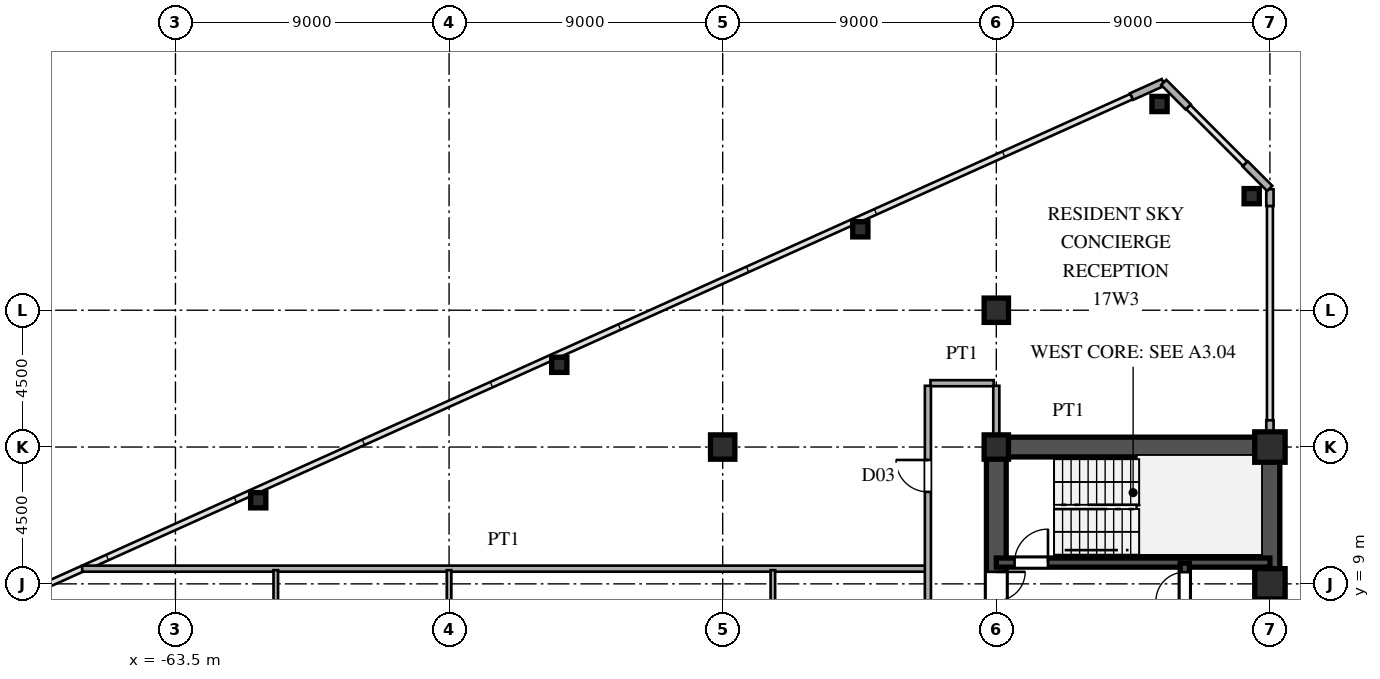
"""IFC4 building model, lengths in metres.
Left out: names, types, materials, properties, quantities, classifications, styles, units other than length and angle.
Written with IfcOpenShell. Run it as: python <this file> out.ifc"""

import sys

from ifc_helpers import new_model, si_unit, direction, frame, frame_2d, origin, origin_2d, place, context, subcontext, project, spatial, rectangle, hollow_rectangle, i_section, extrude, source, transform, mapped, element, fill, save


model = new_model("IFC4")
c1 = context("Model", 3, precision=1e-05, world=origin(), true_north=direction((0.0, 1.0)))
c2 = subcontext(c1, "Body", "Model", "MODEL_VIEW")
j1 = project(units=[si_unit("LENGTHUNIT", "METRE"), si_unit("PLANEANGLEUNIT", "RADIAN")], contexts=[c1])
p1 = place(None, origin())
s1 = spatial("IfcSite", under=j1, at=p1, CompositionType="ELEMENT")
p2 = place(p1, origin())
s2 = spatial("IfcBuilding", under=s1, at=p2, CompositionType="ELEMENT")
p3 = place(p2, frame((0.0, 0.0, 65.7)))
s3 = spatial("IfcBuildingStorey", under=s2, at=p3, CompositionType="ELEMENT", Elevation=65.7)
m1 = source(origin(), c2, "Body", "SweptSolid", [
    extrude(hollow_rectangle(XDim=1.0, YDim=1.0, WallThickness=0.042, at=origin_2d()), origin(), (0.0, 0.0, 1.0), 3.6),
])
for number, where, z_axis, x_axis in (
    (1, (-27.5, 9.0, 0.0), (0.0, 0.0, 1.0), (1.0, 0.0, 0.0)),
    (2, (-27.5, 13.5, 0.0), (0.0, 0.0, 1.0), (1.0, 0.0, 0.0)),
):
    element("IfcColumn", number, at=place(p3, frame(where, z_axis=z_axis, x_axis=x_axis)), inside=s3, PredefinedType="COLUMN", context=c2, shape_type="MappedRepresentation", body=[
        mapped(m1, transform((0.0, 0.0, 0.0), scale=1.0)),
    ])
m2 = source(origin(), c2, "Body", "SweptSolid", [
    extrude(i_section(OverallWidth=0.8, OverallDepth=0.8, WebThickness=0.032, FlangeThickness=0.05, at=origin_2d()), origin(), (0.0, 0.0, 1.0), 3.6),
])
for number, where, z_axis, x_axis in (
    (3, (-36.5, 13.5, 0.0), (0.0, 0.0, 1.0), (1.0, 0.0, 0.0)),
    (4, (-36.5, 18.0, 0.0), (0.0, 0.0, 1.0), (1.0, 0.0, 0.0)),
    (5, (-45.5, 13.5, 0.0), (0.0, 0.0, 1.0), (1.0, 0.0, 0.0)),
):
    element("IfcColumn", number, at=place(p3, frame(where, z_axis=z_axis, x_axis=x_axis)), inside=s3, PredefinedType="COLUMN", context=c2, shape_type="MappedRepresentation", body=[
        mapped(m2, transform((0.0, 0.0, 0.0), scale=1.0)),
    ])
m3 = source(origin(), c2, "Body", "SweptSolid", [
    extrude(hollow_rectangle(XDim=0.5, YDim=0.5, WallThickness=0.02, at=origin_2d()), origin(), (0.0, 0.0, 1.0), 3.6),
])
for number, where, z_axis, x_axis in (
    (6, (-28.1, 21.751, 0.0), (0.0, 0.0, 1.0), (1.0, 0.0, 0.0)),
    (7, (-31.131, 24.783, 0.0), (0.0, 0.0, 1.0), (1.0, 0.0, 0.0)),
    (8, (-40.973, 20.661, 0.0), (0.0, 0.0, 1.0), (1.0, 0.0, 0.0)),
    (9, (-50.875, 16.205, 0.0), (0.0, 0.0, 1.0), (1.0, 0.0, 0.0)),
    (10, (-60.778, 11.749, 0.0), (0.0, 0.0, 1.0), (1.0, 0.0, 0.0)),
):
    element("IfcColumn", number, at=place(p3, frame(where, z_axis=z_axis, x_axis=x_axis)), inside=s3, PredefinedType="COLUMN", context=c2, shape_type="MappedRepresentation", body=[
        mapped(m3, transform((0.0, 0.0, 0.0), scale=1.0)),
    ])
p4 = place(p3, frame((-27.5, 13.83, 0.0), z_axis=(0.0, 0.0, 1.0), x_axis=(0.0, 1.0, 0.0)))
e11 = element("IfcWall", 11, at=p4, inside=s3, PredefinedType="SOLIDWALL", context=c2, shape_type="SweptSolid", body=[
    extrude(rectangle(XDim=0.55, YDim=0.24, at=frame_2d((0.275, 0.0))), origin(), (0.0, 0.0, 1.0), 2.88),
])
p5 = place(p3, frame((-27.5, 21.43, 0.0), z_axis=(0.0, 0.0, 1.0), x_axis=(0.0, 1.0, 0.0)))
e12 = element("IfcWall", 12, at=p5, inside=s3, PredefinedType="SOLIDWALL", context=c2, shape_type="SweptSolid", body=[
    extrude(rectangle(XDim=0.55, YDim=0.24, at=frame_2d((0.275, 0.0))), origin(), (0.0, 0.0, 1.0), 3.38),
])
for number, where, z_axis, x_axis in (
    (13, (-27.507, 22.007, 0.0), (0.0, 0.0, 1.0), (-0.707, 0.707, 0.0)),
    (14, (-30.187, 24.687, 0.0), (0.0, 0.0, 1.0), (-0.707, 0.707, 0.0)),
):
    element("IfcWall", number, at=place(p3, frame(where, z_axis=z_axis, x_axis=x_axis)), inside=s3, PredefinedType="SOLIDWALL", context=c2, shape_type="SweptSolid", body=[
        extrude(rectangle(XDim=1.14, YDim=0.24, at=frame_2d((0.57, 0.0))), origin(), (0.0, 0.0, 1.0), 3.38),
    ])
p6 = place(p3, frame((-31.009, 25.496, 0.0), z_axis=(0.0, 0.0, 1.0), x_axis=(-0.911929519623, -0.410346866979, 0.0)))
e15 = element("IfcWall", 15, at=p6, inside=s3, PredefinedType="SOLIDWALL", context=c2, shape_type="SweptSolid", body=[
    extrude(rectangle(XDim=1.14, YDim=0.24, at=frame_2d((0.57, 0.0))), origin(), (0.0, 0.0, 1.0), 3.38),
])
p7 = place(p3, frame((-27.5, 1.3, 0.0), z_axis=(0.0, 0.0, 1.0), x_axis=(0.0, 1.0, 0.0)))
e16 = element("IfcWall", 16, at=p7, inside=s3, PredefinedType="SHEAR", context=c2, shape_type="SweptSolid", body=[
    extrude(rectangle(XDim=12.2, YDim=0.65, at=frame_2d((6.1, 0.0))), origin(), (0.0, 0.0, 1.0), 3.38),
])
p8 = place(p3, frame((-36.5, 13.5, 0.0), z_axis=(0.0, 0.0, 1.0), x_axis=(1.0, 0.0, 0.0)))
e17 = element("IfcWall", 17, at=p8, inside=s3, PredefinedType="SHEAR", context=c2, shape_type="SweptSolid", body=[
    extrude(rectangle(XDim=9.0, YDim=0.65, at=frame_2d((4.5, 0.0))), origin(), (0.0, 0.0, 1.0), 3.38),
])
p9 = place(p3, frame((-36.5, 8.2, 0.0), z_axis=(0.0, 0.0, 1.0), x_axis=(0.0, 1.0, 0.0)))
e18 = element("IfcWall", 18, at=p9, inside=s3, PredefinedType="SHEAR", context=c2, shape_type="SweptSolid", body=[
    extrude(rectangle(XDim=5.45, YDim=0.65, at=frame_2d((2.725, 0.0))), origin(), (0.0, 0.0, 1.0), 3.38),
])
p10 = place(p9, frame((0.245, 0.0, 0.0)))
e19 = element("IfcOpeningElement", 19, at=p10, cuts=e18, PredefinedType="OPENING", context=c2, shape_type="SweptSolid", body=[
    extrude(rectangle(XDim=0.95, YDim=2.15, at=frame_2d((0.475, 1.075))), frame((0.0, 0.335, 0.0), z_axis=(0.0, -1.0, 0.0), x_axis=(1.0, 0.0, 0.0)), (0.0, 0.0, 1.0), 0.67),
])
p11 = place(p3, frame((-36.5, 9.7, 0.0), z_axis=(0.0, 0.0, 1.0), x_axis=(1.0, 0.0, 0.0)))
e20 = element("IfcWall", 20, at=p11, inside=s3, PredefinedType="SHEAR", context=c2, shape_type="SweptSolid", body=[
    extrude(rectangle(XDim=9.0, YDim=0.3, at=frame_2d((4.5, 0.0))), origin(), (0.0, 0.0, 1.0), 3.38),
])
p12 = place(p11, frame((0.6, 0.0, 0.0)))
e21 = element("IfcOpeningElement", 21, at=p12, cuts=e20, PredefinedType="OPENING", context=c2, shape_type="SweptSolid", body=[
    extrude(rectangle(XDim=1.1, YDim=2.2, at=frame_2d((0.55, 1.1))), frame((0.0, 0.16, 0.0), z_axis=(0.0, -1.0, 0.0), x_axis=(1.0, 0.0, 0.0)), (0.0, 0.0, 1.0), 0.32),
])
p13 = place(p3, frame((-30.3, 8.15, 0.0), z_axis=(0.0, 0.0, 1.0), x_axis=(0.0, 1.0, 0.0)))
e22 = element("IfcWall", 22, at=p13, inside=s3, PredefinedType="SHEAR", context=c2, shape_type="SweptSolid", body=[
    extrude(rectangle(XDim=1.53, YDim=0.3, at=frame_2d((0.765, 0.0))), origin(), (0.0, 0.0, 1.0), 3.38),
])
p14 = place(p13, frame((0.285, 0.0, 0.0)))
e23 = element("IfcOpeningElement", 23, at=p14, cuts=e22, PredefinedType="OPENING", context=c2, shape_type="SweptSolid", body=[
    extrude(rectangle(XDim=0.95, YDim=2.15, at=frame_2d((0.475, 1.075))), frame((0.0, 0.16, 0.0), z_axis=(0.0, -1.0, 0.0), x_axis=(1.0, 0.0, 0.0)), (0.0, 0.0, 1.0), 0.32),
])
p15 = place(p3, frame((-66.568, 9.5, 0.0), z_axis=(0.0, 0.0, 1.0), x_axis=(1.0, 0.0, 0.0)))
e24 = element("IfcWall", 24, at=p15, inside=s3, PredefinedType="PARTITIONING", context=c2, shape_type="SweptSolid", body=[
    extrude(rectangle(XDim=27.738, YDim=0.2, at=frame_2d((13.869, 0.0))), origin(), (0.0, 0.0, 1.0), 3.38),
])
p16 = place(p3, frame((-38.665, 15.6, 0.0), z_axis=(0.0, 0.0, 1.0), x_axis=(1.0, 0.0, 0.0)))
e25 = element("IfcWall", 25, at=p16, inside=s3, PredefinedType="PARTITIONING", context=c2, shape_type="SweptSolid", body=[
    extrude(rectangle(XDim=2.08, YDim=0.2, at=frame_2d((1.04, 0.0))), origin(), (0.0, 0.0, 1.0), 3.38),
])
p17 = place(p3, frame((-60.2, -9.522, 0.0), z_axis=(0.0, 0.0, 1.0), x_axis=(0.0, 1.0, 0.0)))
e26 = element("IfcWall", 26, at=p17, inside=s3, PredefinedType="PARTITIONING", context=c2, shape_type="SweptSolid", body=[
    extrude(rectangle(XDim=18.972, YDim=0.15, at=frame_2d((9.486, 0.0))), origin(), (0.0, 0.0, 1.0), 3.38),
])
p18 = place(p17, frame((2.011, 0.0, 0.0)))
e27 = element("IfcOpeningElement", 27, at=p18, cuts=e26, PredefinedType="OPENING", context=c2, shape_type="SweptSolid", body=[
    extrude(rectangle(XDim=0.95, YDim=2.15, at=frame_2d((0.475, 1.075))), frame((0.0, 0.085, 0.0), z_axis=(0.0, -1.0, 0.0), x_axis=(1.0, 0.0, 0.0)), (0.0, 0.0, 1.0), 0.17),
])
p19 = place(p17, frame((6.88, 0.0, 0.0)))
e28 = element("IfcOpeningElement", 28, at=p19, cuts=e26, PredefinedType="OPENING", context=c2, shape_type="SweptSolid", body=[
    extrude(rectangle(XDim=0.95, YDim=2.15, at=frame_2d((0.475, 1.075))), frame((0.0, 0.085, 0.0), z_axis=(0.0, -1.0, 0.0), x_axis=(1.0, 0.0, 0.0)), (0.0, 0.0, 1.0), 0.17),
])
p20 = place(p17, frame((11.547, 0.0, 0.0)))
e29 = element("IfcOpeningElement", 29, at=p20, cuts=e26, PredefinedType="OPENING", context=c2, shape_type="SweptSolid", body=[
    extrude(rectangle(XDim=0.95, YDim=2.15, at=frame_2d((0.475, 1.075))), frame((0.0, 0.085, 0.0), z_axis=(0.0, -1.0, 0.0), x_axis=(1.0, 0.0, 0.0)), (0.0, 0.0, 1.0), 0.17),
])
p21 = place(p17, frame((16.214, 0.0, 0.0)))
e30 = element("IfcOpeningElement", 30, at=p21, cuts=e26, PredefinedType="OPENING", context=c2, shape_type="SweptSolid", body=[
    extrude(rectangle(XDim=0.95, YDim=2.15, at=frame_2d((0.475, 1.075))), frame((0.0, 0.085, 0.0), z_axis=(0.0, -1.0, 0.0), x_axis=(1.0, 0.0, 0.0)), (0.0, 0.0, 1.0), 0.17),
])
p22 = place(p3, frame((-54.5, -14.595, 0.0), z_axis=(0.0, 0.0, 1.0), x_axis=(0.0, 1.0, 0.0)))
e31 = element("IfcWall", 31, at=p22, inside=s3, PredefinedType="PARTITIONING", context=c2, shape_type="SweptSolid", body=[
    extrude(rectangle(XDim=24.045, YDim=0.15, at=frame_2d((12.022, 0.0))), origin(), (0.0, 0.0, 1.0), 2.68),
])
p23 = place(p22, frame((2.011, 0.0, 0.0)))
e32 = element("IfcOpeningElement", 32, at=p23, cuts=e31, PredefinedType="OPENING", context=c2, shape_type="SweptSolid", body=[
    extrude(rectangle(XDim=0.95, YDim=2.15, at=frame_2d((0.475, 1.075))), frame((0.0, 0.085, 0.0), z_axis=(0.0, -1.0, 0.0), x_axis=(1.0, 0.0, 0.0)), (0.0, 0.0, 1.0), 0.17),
])
p24 = place(p22, frame((7.084, 0.0, 0.0)))
e33 = element("IfcOpeningElement", 33, at=p24, cuts=e31, PredefinedType="OPENING", context=c2, shape_type="SweptSolid", body=[
    extrude(rectangle(XDim=0.95, YDim=2.15, at=frame_2d((0.475, 1.075))), frame((0.0, 0.085, 0.0), z_axis=(0.0, -1.0, 0.0), x_axis=(1.0, 0.0, 0.0)), (0.0, 0.0, 1.0), 0.17),
])
p25 = place(p22, frame((16.62, 0.0, 0.0)))
e34 = element("IfcOpeningElement", 34, at=p25, cuts=e31, PredefinedType="OPENING", context=c2, shape_type="SweptSolid", body=[
    extrude(rectangle(XDim=0.95, YDim=2.15, at=frame_2d((0.475, 1.075))), frame((0.0, 0.085, 0.0), z_axis=(0.0, -1.0, 0.0), x_axis=(1.0, 0.0, 0.0)), (0.0, 0.0, 1.0), 0.17),
])
p26 = place(p3, frame((-43.85, 5.352, 0.0), z_axis=(0.0, 0.0, 1.0), x_axis=(0.0, 1.0, 0.0)))
e35 = element("IfcWall", 35, at=p26, inside=s3, PredefinedType="PARTITIONING", context=c2, shape_type="SweptSolid", body=[
    extrude(rectangle(XDim=4.098, YDim=0.15, at=frame_2d((2.049, 0.0))), origin(), (0.0, 0.0, 1.0), 3.38),
])
p27 = place(p3, frame((-38.75, -15.515, 0.0), z_axis=(0.0, 0.0, 1.0), x_axis=(0.0, 1.0, 0.0)))
e36 = element("IfcWall", 36, at=p27, inside=s3, PredefinedType="PARTITIONING", context=c2, shape_type="SweptSolid", body=[
    extrude(rectangle(XDim=31.03, YDim=0.2, at=frame_2d((15.515, 0.0))), origin(), (0.0, 0.0, 1.0), 3.38),
])
p28 = place(p27, frame((4.913, 0.0, 0.0)))
e37 = element("IfcOpeningElement", 37, at=p28, cuts=e36, PredefinedType="OPENING", context=c2, shape_type="SweptSolid", body=[
    extrude(rectangle(XDim=1.05, YDim=2.25, at=frame_2d((0.525, 1.125))), frame((0.0, 0.11, 0.0), z_axis=(0.0, -1.0, 0.0), x_axis=(1.0, 0.0, 0.0)), (0.0, 0.0, 1.0), 0.22),
])
p29 = place(p27, frame((17.28, 0.0, 0.0)))
e38 = element("IfcOpeningElement", 38, at=p29, cuts=e36, PredefinedType="OPENING", context=c2, shape_type="SweptSolid", body=[
    extrude(rectangle(XDim=1.05, YDim=2.25, at=frame_2d((0.525, 1.125))), frame((0.0, 0.11, 0.0), z_axis=(0.0, -1.0, 0.0), x_axis=(1.0, 0.0, 0.0)), (0.0, 0.0, 1.0), 0.22),
])
p30 = place(p27, frame((27.54, 0.0, 0.0)))
e39 = element("IfcOpeningElement", 39, at=p30, cuts=e36, PredefinedType="OPENING", context=c2, shape_type="SweptSolid", body=[
    extrude(rectangle(XDim=1.05, YDim=2.25, at=frame_2d((0.525, 1.125))), frame((0.0, 0.11, 0.0), z_axis=(0.0, -1.0, 0.0), x_axis=(1.0, 0.0, 0.0)), (0.0, 0.0, 1.0), 0.22),
])
p31 = place(p3, frame((-36.5, 13.83, 0.0), z_axis=(0.0, 0.0, 1.0), x_axis=(0.0, 1.0, 0.0)))
e40 = element("IfcWall", 40, at=p31, inside=s3, PredefinedType="PARTITIONING", context=c2, shape_type="SweptSolid", body=[
    extrude(rectangle(XDim=1.685, YDim=0.2, at=frame_2d((0.842, 0.0))), origin(), (0.0, 0.0, 1.0), 2.68),
])
m4 = source(origin(), c2, "Body", "SweptSolid", [
    extrude(rectangle(XDim=0.95, YDim=2.15, at=frame_2d((0.475, 1.075))), frame((0.0, 0.025, 0.0), z_axis=(0.0, -1.0, 0.0), x_axis=(1.0, 0.0, 0.0)), (0.0, 0.0, 1.0), 0.05),
])
p32 = place(p10, frame((0.95, 0.0, 0.0), z_axis=(0.0, 0.0, 1.0), x_axis=(-1.0, 0.0, 0.0)))
e41 = element("IfcDoor", 41, at=p32, inside=s3, OperationType="SINGLE_SWING_RIGHT", PredefinedType="DOOR", context=c2, shape_type="MappedRepresentation", body=[
    mapped(m4, transform((0.0, 0.0, 0.0), scale=1.0)),
])
fill(e19, e41)
m5 = source(origin(), c2, "Body", "SweptSolid", [
    extrude(rectangle(XDim=1.1, YDim=2.2, at=frame_2d((0.55, 1.1))), frame((0.0, 0.025, 0.0), z_axis=(0.0, -1.0, 0.0), x_axis=(1.0, 0.0, 0.0)), (0.0, 0.0, 1.0), 0.05),
])
p33 = place(p12, origin())
e42 = element("IfcDoor", 42, at=p33, inside=s3, OperationType="SINGLE_SWING_RIGHT", PredefinedType="DOOR", context=c2, shape_type="MappedRepresentation", body=[
    mapped(m5, transform((0.0, 0.0, 0.0), scale=1.0)),
])
fill(e21, e42)
p34 = place(p14, origin())
e43 = element("IfcDoor", 43, at=p34, inside=s3, OperationType="SINGLE_SWING_LEFT", PredefinedType="DOOR", context=c2, shape_type="MappedRepresentation", body=[
    mapped(m4, transform((0.0, 0.0, 0.0), scale=1.0)),
])
fill(e23, e43)
m6 = source(origin(), c2, "Body", "SweptSolid", [
    extrude(rectangle(XDim=1.05, YDim=2.25, at=frame_2d((0.525, 1.125))), frame((0.0, 0.025, 0.0), z_axis=(0.0, -1.0, 0.0), x_axis=(1.0, 0.0, 0.0)), (0.0, 0.0, 1.0), 0.05),
])
p35 = place(p30, origin())
e44 = element("IfcDoor", 44, at=p35, inside=s3, OperationType="SINGLE_SWING_RIGHT", PredefinedType="DOOR", context=c2, shape_type="MappedRepresentation", body=[
    mapped(m6, transform((0.0, 0.0, 0.0), scale=1.0)),
])
fill(e39, e44)
save(model, sys.argv[1])
